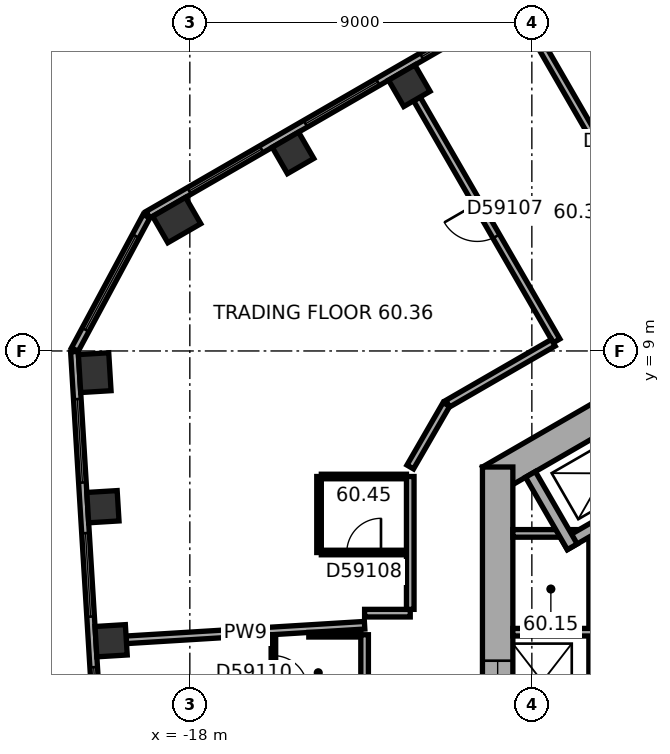
"""IFC4 building model, lengths in metres.
Left out: names, types, materials, properties, quantities, classifications, styles, units other than length and angle.
Written with IfcOpenShell. Run it as: python <this file> out.ifc"""

import sys

from ifc_helpers import new_model, si_unit, direction, frame, frame_2d, origin, origin_2d, place, context, subcontext, project, spatial, rectangle, extrude, element, fill, save


model = new_model("IFC4")
c1 = context("Model", 3, precision=1e-05, world=origin(), true_north=direction((0.0, 1.0)))
c2 = subcontext(c1, "Body", "Model", "MODEL_VIEW")
j1 = project(units=[si_unit("LENGTHUNIT", "METRE"), si_unit("PLANEANGLEUNIT", "RADIAN")], contexts=[c1])
p1 = place(None, origin())
s1 = spatial("IfcSite", under=j1, at=p1, CompositionType="ELEMENT")
p2 = place(p1, origin())
s2 = spatial("IfcBuilding", under=s1, at=p2, CompositionType="ELEMENT")
p3 = place(p2, frame((0.0, 0.0, 243.9)))
s3 = spatial("IfcBuildingStorey", under=s2, at=p3, CompositionType="ELEMENT", Elevation=243.9)
for number, where, z_axis, x_axis in (
    (1, (-12.225, 15.978, 0.0), (0.0, 0.0, 1.0), (-0.866, -0.5, 0.0)),
    (2, (-15.285, 14.211, 0.0), (0.0, 0.0, 1.0), (-0.866, -0.5, 0.0)),
):
    element("IfcColumn", number, at=place(p3, frame(where, z_axis=z_axis, x_axis=x_axis)), inside=s3, PredefinedType="COLUMN", context=c2, shape_type="SweptSolid", body=[
        extrude(rectangle(XDim=0.8, YDim=0.8, at=origin_2d()), origin(), (0.0, 0.0, 1.0), 3.7),
    ])
for number, where, z_axis, x_axis in (
    (3, (-18.345, 12.445, 0.0), (0.0, 0.0, 1.0), (-0.866, -0.5, 0.0)),
    (4, (-20.503, 8.429, 0.0), (0.0, 0.0, 1.0), (0.061, -0.998, 0.0)),
):
    element("IfcColumn", number, at=place(p3, frame(where, z_axis=z_axis, x_axis=x_axis)), inside=s3, PredefinedType="COLUMN", context=c2, shape_type="SweptSolid", body=[
        extrude(rectangle(XDim=1.0, YDim=0.8, at=origin_2d()), origin(), (0.0, 0.0, 1.0), 3.7),
    ])
for number, where, z_axis, x_axis in (
    (5, (-20.287, 4.902, 0.0), (0.0, 0.0, 1.0), (0.061, -0.998, 0.0)),
    (6, (-20.071, 1.375, 0.0), (0.0, 0.0, 1.0), (0.061, -0.998, 0.0)),
):
    element("IfcColumn", number, at=place(p3, frame(where, z_axis=z_axis, x_axis=x_axis)), inside=s3, PredefinedType="COLUMN", context=c2, shape_type="SweptSolid", body=[
        extrude(rectangle(XDim=0.8, YDim=0.8, at=origin_2d()), origin(), (0.0, 0.0, 1.0), 3.7),
    ])
p4 = place(p3, frame((0.2, 11.547, 0.0), z_axis=(0.0, 0.0, 1.0), x_axis=(-0.866023897231, -0.500002609418, 0.0)))
e7 = element("IfcWall", 7, at=p4, inside=s3, PredefinedType="SHEAR", context=c2, shape_type="SweptSolid", body=[
    extrude(rectangle(XDim=11.894, YDim=0.8, at=frame_2d((5.947, 0.0))), origin(), (0.0, 0.0, 1.0), 3.7),
])
p5 = place(p4, frame((6.147, 0.0, 0.0)))
e8 = element("IfcOpeningElement", 8, at=p5, cuts=e7, PredefinedType="OPENING", context=c2, shape_type="SweptSolid", body=[
    extrude(rectangle(XDim=1.5, YDim=2.1, at=frame_2d((0.75, 1.05))), frame((0.0, 0.41, 0.0), z_axis=(0.0, -1.0, 0.0), x_axis=(1.0, 0.0, 0.0)), (0.0, 0.0, 1.0), 0.82),
])
p6 = place(p4, frame((1.697, 0.0, 0.0)))
e9 = element("IfcOpeningElement", 9, at=p6, cuts=e7, PredefinedType="OPENING", context=c2, shape_type="SweptSolid", body=[
    extrude(rectangle(XDim=0.9, YDim=2.1, at=frame_2d((0.45, 1.05))), frame((0.0, 0.41, 0.0), z_axis=(0.0, -1.0, 0.0), x_axis=(1.0, 0.0, 0.0)), (0.0, 0.0, 1.0), 0.82),
])
p7 = place(p4, frame((4.297, 0.0, 0.0)))
e10 = element("IfcOpeningElement", 10, at=p7, cuts=e7, PredefinedType="OPENING", context=c2, shape_type="SweptSolid", body=[
    extrude(rectangle(XDim=0.9, YDim=2.1, at=frame_2d((0.45, 1.05))), frame((0.0, 0.41, 0.0), z_axis=(0.0, -1.0, 0.0), x_axis=(1.0, 0.0, 0.0)), (0.0, 0.0, 1.0), 0.82),
])
p8 = place(p3, frame((-9.9, 5.947, 0.0), z_axis=(0.0, 0.0, 1.0), x_axis=(0.0, -1.0, 0.0)))
e11 = element("IfcWall", 11, at=p8, inside=s3, PredefinedType="SHEAR", context=c2, shape_type="SweptSolid", body=[
    extrude(rectangle(XDim=11.894, YDim=0.8, at=frame_2d((5.947, 0.0))), origin(), (0.0, 0.0, 1.0), 3.7),
])
p9 = place(p8, frame((5.097, 0.0, 0.0)))
e12 = element("IfcOpeningElement", 12, at=p9, cuts=e11, PredefinedType="OPENING", context=c2, shape_type="SweptSolid", body=[
    extrude(rectangle(XDim=1.1, YDim=2.1, at=frame_2d((0.55, 1.05))), frame((0.0, 0.41, 0.0), z_axis=(0.0, -1.0, 0.0), x_axis=(1.0, 0.0, 0.0)), (0.0, 0.0, 1.0), 0.82),
])
p10 = place(p8, frame((7.697, 0.0, 0.0)))
e13 = element("IfcOpeningElement", 13, at=p10, cuts=e11, PredefinedType="OPENING", context=c2, shape_type="SweptSolid", body=[
    extrude(rectangle(XDim=1.1, YDim=2.1, at=frame_2d((0.55, 1.05))), frame((0.0, 0.41, 0.0), z_axis=(0.0, -1.0, 0.0), x_axis=(1.0, 0.0, 0.0)), (0.0, 0.0, 1.0), 0.82),
])
p11 = place(p3, frame((-2.786, 22.005, 0.0), z_axis=(0.0, 0.0, 1.0), x_axis=(-0.866026555358, -0.49999800541, 0.0)))
e14 = element("IfcWall", 14, at=p11, inside=s3, PredefinedType="STANDARD", context=c2, shape_type="SweptSolid", body=[
    extrude(rectangle(XDim=18.841, YDim=0.2, at=frame_2d((9.421, 0.0))), origin(), (0.0, 0.0, 1.0), 3.7),
])
p12 = place(p11, frame((1.254, 0.0, 0.9)))
e15 = element("IfcOpeningElement", 15, at=p12, cuts=e14, PredefinedType="OPENING", context=c2, shape_type="SweptSolid", body=[
    extrude(rectangle(XDim=2.2, YDim=2.0, at=frame_2d((1.1, 1.0))), frame((0.0, 0.11, 0.0), z_axis=(0.0, -1.0, 0.0), x_axis=(1.0, 0.0, 0.0)), (0.0, 0.0, 1.0), 0.22),
])
p13 = place(p11, frame((4.788, 0.0, 0.9)))
e16 = element("IfcOpeningElement", 16, at=p13, cuts=e14, PredefinedType="OPENING", context=c2, shape_type="SweptSolid", body=[
    extrude(rectangle(XDim=2.2, YDim=2.0, at=frame_2d((1.1, 1.0))), frame((0.0, 0.11, 0.0), z_axis=(0.0, -1.0, 0.0), x_axis=(1.0, 0.0, 0.0)), (0.0, 0.0, 1.0), 0.22),
])
p14 = place(p11, frame((8.321, 0.0, 0.9)))
e17 = element("IfcOpeningElement", 17, at=p14, cuts=e14, PredefinedType="OPENING", context=c2, shape_type="SweptSolid", body=[
    extrude(rectangle(XDim=2.2, YDim=2.0, at=frame_2d((1.1, 1.0))), frame((0.0, 0.11, 0.0), z_axis=(0.0, -1.0, 0.0), x_axis=(1.0, 0.0, 0.0)), (0.0, 0.0, 1.0), 0.22),
])
p15 = place(p11, frame((11.855, 0.0, 0.9)))
e18 = element("IfcOpeningElement", 18, at=p15, cuts=e14, PredefinedType="OPENING", context=c2, shape_type="SweptSolid", body=[
    extrude(rectangle(XDim=2.2, YDim=2.0, at=frame_2d((1.1, 1.0))), frame((0.0, 0.11, 0.0), z_axis=(0.0, -1.0, 0.0), x_axis=(1.0, 0.0, 0.0)), (0.0, 0.0, 1.0), 0.22),
])
p16 = place(p11, frame((15.389, 0.0, 0.9)))
e19 = element("IfcOpeningElement", 19, at=p16, cuts=e14, PredefinedType="OPENING", context=c2, shape_type="SweptSolid", body=[
    extrude(rectangle(XDim=2.2, YDim=2.0, at=frame_2d((1.1, 1.0))), frame((0.0, 0.11, 0.0), z_axis=(0.0, -1.0, 0.0), x_axis=(1.0, 0.0, 0.0)), (0.0, 0.0, 1.0), 0.22),
])
p17 = place(p3, frame((-19.141, 12.545, 0.0), z_axis=(0.0, 0.0, 1.0), x_axis=(-0.473306370921, -0.880897882416, 0.0)))
e20 = element("IfcWall", 20, at=p17, inside=s3, PredefinedType="STANDARD", context=c2, shape_type="SweptSolid", body=[
    extrude(rectangle(XDim=3.983, YDim=0.2, at=frame_2d((1.991, 0.0))), origin(), (0.0, 0.0, 1.0), 3.7),
])
p18 = place(p17, frame((0.591, 0.0, 0.9)))
e21 = element("IfcOpeningElement", 21, at=p18, cuts=e20, PredefinedType="OPENING", context=c2, shape_type="SweptSolid", body=[
    extrude(rectangle(XDim=2.8, YDim=2.0, at=frame_2d((1.4, 1.0))), frame((0.0, 0.11, 0.0), z_axis=(0.0, -1.0, 0.0), x_axis=(1.0, 0.0, 0.0)), (0.0, 0.0, 1.0), 0.22),
])
p19 = place(p3, frame((-21.038, 8.984, 0.0), z_axis=(0.0, 0.0, 1.0), x_axis=(0.061043935634, -0.998135079998, 0.0)))
e22 = element("IfcWall", 22, at=p19, inside=s3, PredefinedType="STANDARD", context=c2, shape_type="SweptSolid", body=[
    extrude(rectangle(XDim=18.841, YDim=0.2, at=frame_2d((9.421, 0.0))), origin(), (0.0, 0.0, 1.0), 3.7),
])
p20 = place(p19, frame((1.253, 0.0, 0.9)))
e23 = element("IfcOpeningElement", 23, at=p20, cuts=e22, PredefinedType="OPENING", context=c2, shape_type="SweptSolid", body=[
    extrude(rectangle(XDim=2.2, YDim=2.0, at=frame_2d((1.1, 1.0))), frame((0.0, 0.11, 0.0), z_axis=(0.0, -1.0, 0.0), x_axis=(1.0, 0.0, 0.0)), (0.0, 0.0, 1.0), 0.22),
])
p21 = place(p19, frame((4.786, 0.0, 0.9)))
e24 = element("IfcOpeningElement", 24, at=p21, cuts=e22, PredefinedType="OPENING", context=c2, shape_type="SweptSolid", body=[
    extrude(rectangle(XDim=2.2, YDim=2.0, at=frame_2d((1.1, 1.0))), frame((0.0, 0.11, 0.0), z_axis=(0.0, -1.0, 0.0), x_axis=(1.0, 0.0, 0.0)), (0.0, 0.0, 1.0), 0.22),
])
p22 = place(p19, frame((8.32, 0.0, 0.9)))
e25 = element("IfcOpeningElement", 25, at=p22, cuts=e22, PredefinedType="OPENING", context=c2, shape_type="SweptSolid", body=[
    extrude(rectangle(XDim=2.2, YDim=2.0, at=frame_2d((1.1, 1.0))), frame((0.0, 0.11, 0.0), z_axis=(0.0, -1.0, 0.0), x_axis=(1.0, 0.0, 0.0)), (0.0, 0.0, 1.0), 0.22),
])
p23 = place(p19, frame((11.854, 0.0, 0.9)))
e26 = element("IfcOpeningElement", 26, at=p23, cuts=e22, PredefinedType="OPENING", context=c2, shape_type="SweptSolid", body=[
    extrude(rectangle(XDim=2.2, YDim=2.0, at=frame_2d((1.1, 1.0))), frame((0.0, 0.11, 0.0), z_axis=(0.0, -1.0, 0.0), x_axis=(1.0, 0.0, 0.0)), (0.0, 0.0, 1.0), 0.22),
])
p24 = place(p19, frame((15.387, 0.0, 0.9)))
e27 = element("IfcOpeningElement", 27, at=p24, cuts=e22, PredefinedType="OPENING", context=c2, shape_type="SweptSolid", body=[
    extrude(rectangle(XDim=2.2, YDim=2.0, at=frame_2d((1.1, 1.0))), frame((0.0, 0.11, 0.0), z_axis=(0.0, -1.0, 0.0), x_axis=(1.0, 0.0, 0.0)), (0.0, 0.0, 1.0), 0.22),
])
p25 = place(p3, frame((-7.4, 4.3, 0.0), z_axis=(0.0, 0.0, 1.0), x_axis=(0.0, -1.0, 0.0)))
e28 = element("IfcWall", 28, at=p25, inside=s3, PredefinedType="PARTITIONING", context=c2, shape_type="SweptSolid", body=[
    extrude(rectangle(XDim=8.0, YDim=0.2, at=frame_2d((4.0, 0.0))), origin(), (0.0, 0.0, 1.0), 3.42),
])
for number, where, z_axis, x_axis in (
    (29, (-7.3, 4.2, 0.0), (0.0, 0.0, 1.0), (-1.0, 0.0, 0.0)),
    (30, (-7.3, 1.6, 0.0), (0.0, 0.0, 1.0), (-1.0, 0.0, 0.0)),
):
    element("IfcWall", number, at=place(p3, frame(where, z_axis=z_axis, x_axis=x_axis)), inside=s3, PredefinedType="PARTITIONING", context=c2, shape_type="SweptSolid", body=[
        extrude(rectangle(XDim=2.2, YDim=0.2, at=frame_2d((1.1, 0.0))), origin(), (0.0, 0.0, 1.0), 3.42),
    ])
p26 = place(p3, frame((-5.24, 5.577, 0.0), z_axis=(0.0, 0.0, 1.0), x_axis=(-0.866014461049, -0.500018952895, 0.0)))
e31 = element("IfcWall", 31, at=p26, inside=s3, PredefinedType="SHEAR", context=c2, shape_type="SweptSolid", body=[
    extrude(rectangle(XDim=3.35, YDim=0.3, at=frame_2d((1.675, 0.0))), origin(), (0.0, 0.0, 1.0), 3.42),
])
p27 = place(p3, frame((-7.937, 3.847, 0.0), z_axis=(0.0, 0.0, 1.0), x_axis=(-0.50002983664, 0.866008176907, 0.0)))
e32 = element("IfcWall", 32, at=p27, inside=s3, PredefinedType="SHEAR", context=c2, shape_type="SweptSolid", body=[
    extrude(rectangle(XDim=2.2, YDim=0.3, at=frame_2d((1.1, 0.0))), origin(), (0.0, 0.0, 1.0), 3.42),
])
p28 = place(p3, frame((-19.672, 1.4, 0.0), z_axis=(0.0, 0.0, 1.0), x_axis=(0.99813499784, 0.061045278997, 0.0)))
e33 = element("IfcWall", 33, at=p28, inside=s3, PredefinedType="PARTITIONING", context=c2, shape_type="SweptSolid", body=[
    extrude(rectangle(XDim=6.283, YDim=0.2, at=frame_2d((3.142, 0.0))), origin(), (0.0, 0.0, 1.0), 2.87),
])
p29 = place(p3, frame((-15.801, -0.467, 0.0), z_axis=(0.0, 0.0, 1.0), x_axis=(0.0, 1.0, 0.0)))
e34 = element("IfcWall", 34, at=p29, inside=s3, PredefinedType="PARTITIONING", context=c2, shape_type="SweptSolid", body=[
    extrude(rectangle(XDim=2.0, YDim=0.12, at=frame_2d((1.0, 0.0))), origin(), (0.0, 0.0, 1.0), 3.42),
])
p30 = place(p29, frame((0.55, 0.0, 0.0)))
e35 = element("IfcOpeningElement", 35, at=p30, cuts=e34, PredefinedType="OPENING", context=c2, shape_type="SweptSolid", body=[
    extrude(rectangle(XDim=0.9, YDim=2.1, at=frame_2d((0.45, 1.05))), frame((0.0, 0.07, 0.0), z_axis=(0.0, -1.0, 0.0), x_axis=(1.0, 0.0, 0.0)), (0.0, 0.0, 1.0), 0.14),
])
p31 = place(p3, frame((-14.869, 1.533, 0.0), z_axis=(0.0, 0.0, 1.0), x_axis=(1.0, 0.0, 0.0)))
e36 = element("IfcWall", 36, at=p31, inside=s3, PredefinedType="PARTITIONING", context=c2, shape_type="SweptSolid", body=[
    extrude(rectangle(XDim=1.368, YDim=0.12, at=frame_2d((0.684, 0.0))), origin(), (0.0, 0.0, 1.0), 3.42),
])
p32 = place(p3, frame((-14.6, 3.697, 0.0), z_axis=(0.0, 0.0, 1.0), x_axis=(0.0, 1.0, 0.0)))
e37 = element("IfcWall", 37, at=p32, inside=s3, PredefinedType="PARTITIONING", context=c2, shape_type="SweptSolid", body=[
    extrude(rectangle(XDim=2.0, YDim=0.12, at=frame_2d((1.0, 0.0))), origin(), (0.0, 0.0, 1.0), 3.42),
])
p33 = place(p3, frame((-14.54, 5.697, 0.0), z_axis=(0.0, 0.0, 1.0), x_axis=(1.0, 0.0, 0.0)))
e38 = element("IfcWall", 38, at=p33, inside=s3, PredefinedType="PARTITIONING", context=c2, shape_type="SweptSolid", body=[
    extrude(rectangle(XDim=2.24, YDim=0.12, at=frame_2d((1.12, 0.0))), origin(), (0.0, 0.0, 1.0), 3.42),
])
p34 = place(p3, frame((-13.401, 1.533, 0.0), z_axis=(0.0, 0.0, 1.0), x_axis=(0.0, -1.0, 0.0)))
e39 = element("IfcWall", 39, at=p34, inside=s3, PredefinedType="PARTITIONING", context=c2, shape_type="SweptSolid", body=[
    extrude(rectangle(XDim=2.0, YDim=0.2, at=frame_2d((1.0, 0.0))), origin(), (0.0, 0.0, 1.0), 3.42),
])
p35 = place(p3, frame((-12.3, 3.697, 0.0), z_axis=(0.0, 0.0, 1.0), x_axis=(-1.0, 0.0, 0.0)))
e40 = element("IfcWall", 40, at=p35, inside=s3, PredefinedType="PARTITIONING", context=c2, shape_type="SweptSolid", body=[
    extrude(rectangle(XDim=2.24, YDim=0.12, at=frame_2d((1.12, 0.0))), origin(), (0.0, 0.0, 1.0), 3.42),
])
p36 = place(p35, frame((0.67, 0.0, 0.0)))
e41 = element("IfcOpeningElement", 41, at=p36, cuts=e40, PredefinedType="OPENING", context=c2, shape_type="SweptSolid", body=[
    extrude(rectangle(XDim=0.9, YDim=2.1, at=frame_2d((0.45, 1.05))), frame((0.0, 0.07, 0.0), z_axis=(0.0, -1.0, 0.0), x_axis=(1.0, 0.0, 0.0)), (0.0, 0.0, 1.0), 0.14),
])
p37 = place(p3, frame((-12.2, 2.101, 0.0), z_axis=(0.0, 0.0, 1.0), x_axis=(-1.0, 0.0, 0.0)))
e42 = element("IfcWall", 42, at=p37, inside=s3, PredefinedType="PARTITIONING", context=c2, shape_type="SweptSolid", body=[
    extrude(rectangle(XDim=1.201, YDim=0.2, at=frame_2d((0.601, 0.0))), origin(), (0.0, 0.0, 1.0), 3.42),
])
p38 = place(p3, frame((-12.2, 5.697, 0.0), z_axis=(0.0, 0.0, 1.0), x_axis=(0.0, -1.0, 0.0)))
e43 = element("IfcWall", 43, at=p38, inside=s3, PredefinedType="PARTITIONING", context=c2, shape_type="SweptSolid", body=[
    extrude(rectangle(XDim=3.496, YDim=0.2, at=frame_2d((1.748, 0.0))), origin(), (0.0, 0.0, 1.0), 3.42),
])
p39 = place(p3, frame((-12.025, 15.632, 0.0), z_axis=(0.0, 0.0, 1.0), x_axis=(0.499983153418, -0.866035129944, 0.0)))
e44 = element("IfcWall", 44, at=p39, inside=s3, PredefinedType="PARTITIONING", context=c2, shape_type="SweptSolid", body=[
    extrude(rectangle(XDim=7.35, YDim=0.2, at=frame_2d((3.675, 0.0))), origin(), (0.0, 0.0, 1.0), 3.42),
])
p40 = place(p39, frame((3.175, 0.0, 0.0)))
e45 = element("IfcOpeningElement", 45, at=p40, cuts=e44, PredefinedType="OPENING", context=c2, shape_type="SweptSolid", body=[
    extrude(rectangle(XDim=1.0, YDim=2.1, at=frame_2d((0.5, 1.05))), frame((0.0, 0.11, 0.0), z_axis=(0.0, -1.0, 0.0), x_axis=(1.0, 0.0, 0.0)), (0.0, 0.0, 1.0), 0.22),
])
p41 = place(p3, frame((-11.25, 7.592, 0.0), z_axis=(0.0, 0.0, 1.0), x_axis=(-0.500022797313, -0.86601224135, 0.0)))
e46 = element("IfcWall", 46, at=p41, inside=s3, PredefinedType="PARTITIONING", context=c2, shape_type="SweptSolid", body=[
    extrude(rectangle(XDim=1.9, YDim=0.2, at=frame_2d((0.95, 0.0))), origin(), (0.0, 0.0, 1.0), 3.42),
])
p42 = place(p3, frame((-8.965, 17.399, 0.0), z_axis=(0.0, 0.0, 1.0), x_axis=(0.499993683172, -0.866029050776, 0.0)))
e47 = element("IfcWall", 47, at=p42, inside=s3, PredefinedType="PARTITIONING", context=c2, shape_type="SweptSolid", body=[
    extrude(rectangle(XDim=7.35, YDim=0.2, at=frame_2d((3.675, 0.0))), origin(), (0.0, 0.0, 1.0), 2.87),
])
p43 = place(p42, frame((3.175, 0.0, 0.0)))
e48 = element("IfcOpeningElement", 48, at=p43, cuts=e47, PredefinedType="OPENING", context=c2, shape_type="SweptSolid", body=[
    extrude(rectangle(XDim=1.0, YDim=2.1, at=frame_2d((0.5, 1.05))), frame((0.0, 0.11, 0.0), z_axis=(0.0, -1.0, 0.0), x_axis=(1.0, 0.0, 0.0)), (0.0, 0.0, 1.0), 0.22),
])
p44 = place(p3, frame((-8.437, 9.217, 0.0), z_axis=(0.0, 0.0, 1.0), x_axis=(-0.866005660673, -0.500034194513, 0.0)))
e49 = element("IfcWall", 49, at=p44, inside=s3, PredefinedType="PARTITIONING", context=c2, shape_type="SweptSolid", body=[
    extrude(rectangle(XDim=3.209, YDim=0.2, at=frame_2d((1.604, 0.0))), origin(), (0.0, 0.0, 1.0), 3.42),
])
p45 = place(p14, origin())
e50 = element("IfcWindow", 50, at=p45, inside=s3, PartitioningType="SINGLE_PANEL", PredefinedType="WINDOW", context=c2, shape_type="SweptSolid", body=[
    extrude(rectangle(XDim=2.2, YDim=2.0, at=frame_2d((1.1, 1.0))), frame((0.0, 0.03, 0.0), z_axis=(0.0, -1.0, 0.0), x_axis=(1.0, 0.0, 0.0)), (0.0, 0.0, 1.0), 0.06),
])
fill(e17, e50)
p46 = place(p15, origin())
e51 = element("IfcWindow", 51, at=p46, inside=s3, PartitioningType="SINGLE_PANEL", PredefinedType="WINDOW", context=c2, shape_type="SweptSolid", body=[
    extrude(rectangle(XDim=2.2, YDim=2.0, at=frame_2d((1.1, 1.0))), frame((0.0, 0.03, 0.0), z_axis=(0.0, -1.0, 0.0), x_axis=(1.0, 0.0, 0.0)), (0.0, 0.0, 1.0), 0.06),
])
fill(e18, e51)
p47 = place(p16, origin())
e52 = element("IfcWindow", 52, at=p47, inside=s3, PartitioningType="SINGLE_PANEL", PredefinedType="WINDOW", context=c2, shape_type="SweptSolid", body=[
    extrude(rectangle(XDim=2.2, YDim=2.0, at=frame_2d((1.1, 1.0))), frame((0.0, 0.03, 0.0), z_axis=(0.0, -1.0, 0.0), x_axis=(1.0, 0.0, 0.0)), (0.0, 0.0, 1.0), 0.06),
])
fill(e19, e52)
p48 = place(p18, origin())
e53 = element("IfcWindow", 53, at=p48, inside=s3, PartitioningType="SINGLE_PANEL", PredefinedType="WINDOW", context=c2, shape_type="SweptSolid", body=[
    extrude(rectangle(XDim=2.8, YDim=2.0, at=frame_2d((1.4, 1.0))), frame((0.0, 0.03, 0.0), z_axis=(0.0, -1.0, 0.0), x_axis=(1.0, 0.0, 0.0)), (0.0, 0.0, 1.0), 0.06),
])
fill(e21, e53)
p49 = place(p20, origin())
e54 = element("IfcWindow", 54, at=p49, inside=s3, PartitioningType="SINGLE_PANEL", PredefinedType="WINDOW", context=c2, shape_type="SweptSolid", body=[
    extrude(rectangle(XDim=2.2, YDim=2.0, at=frame_2d((1.1, 1.0))), frame((0.0, 0.03, 0.0), z_axis=(0.0, -1.0, 0.0), x_axis=(1.0, 0.0, 0.0)), (0.0, 0.0, 1.0), 0.06),
])
fill(e23, e54)
p50 = place(p21, origin())
e55 = element("IfcWindow", 55, at=p50, inside=s3, PartitioningType="SINGLE_PANEL", PredefinedType="WINDOW", context=c2, shape_type="SweptSolid", body=[
    extrude(rectangle(XDim=2.2, YDim=2.0, at=frame_2d((1.1, 1.0))), frame((0.0, 0.03, 0.0), z_axis=(0.0, -1.0, 0.0), x_axis=(1.0, 0.0, 0.0)), (0.0, 0.0, 1.0), 0.06),
])
fill(e24, e55)
p51 = place(p22, origin())
e56 = element("IfcWindow", 56, at=p51, inside=s3, PartitioningType="SINGLE_PANEL", PredefinedType="WINDOW", context=c2, shape_type="SweptSolid", body=[
    extrude(rectangle(XDim=2.2, YDim=2.0, at=frame_2d((1.1, 1.0))), frame((0.0, 0.03, 0.0), z_axis=(0.0, -1.0, 0.0), x_axis=(1.0, 0.0, 0.0)), (0.0, 0.0, 1.0), 0.06),
])
fill(e25, e56)
p52 = place(p9, origin())
e57 = element("IfcDoor", 57, at=p52, inside=s3, OperationType="DOUBLE_DOOR_SLIDING", PredefinedType="DOOR", context=c2, shape_type="SweptSolid", body=[
    extrude(rectangle(XDim=1.1, YDim=2.1, at=frame_2d((0.55, 1.05))), frame((0.0, 0.025, 0.0), z_axis=(0.0, -1.0, 0.0), x_axis=(1.0, 0.0, 0.0)), (0.0, 0.0, 1.0), 0.05),
])
fill(e12, e57)
p53 = place(p40, origin())
e58 = element("IfcDoor", 58, at=p53, inside=s3, OperationType="SINGLE_SWING_LEFT", PredefinedType="DOOR", context=c2, shape_type="SweptSolid", body=[
    extrude(rectangle(XDim=1.0, YDim=2.1, at=frame_2d((0.5, 1.05))), frame((0.0, 0.025, 0.0), z_axis=(0.0, -1.0, 0.0), x_axis=(1.0, 0.0, 0.0)), (0.0, 0.0, 1.0), 0.05),
])
fill(e45, e58)
p54 = place(p36, origin())
e59 = element("IfcDoor", 59, at=p54, inside=s3, OperationType="SINGLE_SWING_LEFT", PredefinedType="DOOR", context=c2, shape_type="SweptSolid", body=[
    extrude(rectangle(XDim=0.9, YDim=2.1, at=frame_2d((0.45, 1.05))), frame((0.0, 0.025, 0.0), z_axis=(0.0, -1.0, 0.0), x_axis=(1.0, 0.0, 0.0)), (0.0, 0.0, 1.0), 0.05),
])
fill(e41, e59)
p55 = place(p30, origin())
e60 = element("IfcDoor", 60, at=p55, inside=s3, OperationType="SINGLE_SWING_LEFT", PredefinedType="DOOR", context=c2, shape_type="SweptSolid", body=[
    extrude(rectangle(XDim=0.9, YDim=2.1, at=frame_2d((0.45, 1.05))), frame((0.0, 0.025, 0.0), z_axis=(0.0, -1.0, 0.0), x_axis=(1.0, 0.0, 0.0)), (0.0, 0.0, 1.0), 0.05),
])
fill(e35, e60)
save(model, sys.argv[1])
